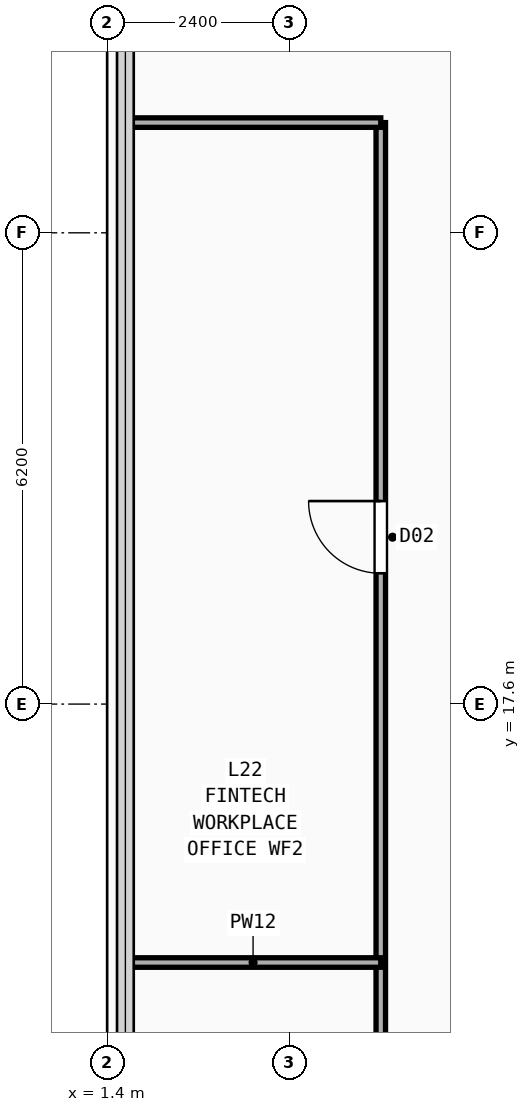
"""IFC4 building model, lengths in metres.
Left out: names, types, materials, properties, quantities, classifications, styles, units other than length and angle.
Written with IfcOpenShell. Run it as: python <this file> out.ifc"""

import sys

from ifc_helpers import new_model, si_unit, direction, frame, frame_2d, origin, place, context, subcontext, project, spatial, rectangle, extrude, element, fill, save


model = new_model("IFC4")
c1 = context("Model", 3, precision=1e-05, world=origin(), true_north=direction((0.0, 1.0)))
c2 = subcontext(c1, "Body", "Model", "MODEL_VIEW")
j1 = project(units=[si_unit("LENGTHUNIT", "METRE"), si_unit("PLANEANGLEUNIT", "RADIAN")], contexts=[c1])
p1 = place(None, origin())
s1 = spatial("IfcSite", under=j1, at=p1, CompositionType="ELEMENT")
p2 = place(p1, origin())
s2 = spatial("IfcBuilding", under=s1, at=p2, CompositionType="ELEMENT")
p3 = place(p2, frame((0.0, 0.0, 87.9)))
s3 = spatial("IfcBuildingStorey", under=s2, at=p3, CompositionType="ELEMENT", Elevation=87.9)
p4 = place(p3, frame((5.0, 7.5, 0.0), z_axis=(0.0, 0.0, 1.0), x_axis=(0.0, 1.0, 0.0)))
e1 = element("IfcWall", 1, at=p4, inside=s3, PredefinedType="PARTITIONING", context=c2, shape_type="SweptSolid", body=[
    extrude(rectangle(XDim=17.75, YDim=0.125, at=frame_2d((8.875, 0.0))), origin(), (0.0, 0.0, 1.0), 3.54),
])
p5 = place(p4, frame((2.85, 0.0, 0.0)))
e2 = element("IfcOpeningElement", 2, at=p5, cuts=e1, PredefinedType="OPENING", context=c2, shape_type="SweptSolid", body=[
    extrude(rectangle(XDim=0.95, YDim=2.15, at=frame_2d((0.475, 1.075))), frame((0.0, 0.073, 0.0), z_axis=(0.0, -1.0, 0.0), x_axis=(1.0, 0.0, 0.0)), (0.0, 0.0, 1.0), 0.145),
])
p6 = place(p4, frame((11.821, 0.0, 0.0)))
e3 = element("IfcOpeningElement", 3, at=p6, cuts=e1, PredefinedType="OPENING", context=c2, shape_type="SweptSolid", body=[
    extrude(rectangle(XDim=0.95, YDim=2.15, at=frame_2d((0.475, 1.075))), frame((0.0, 0.073, 0.0), z_axis=(0.0, -1.0, 0.0), x_axis=(1.0, 0.0, 0.0)), (0.0, 0.0, 1.0), 0.145),
])
for number, where, z_axis, x_axis in (
    (4, (1.64, 25.25, 0.0), (0.0, 0.0, 1.0), (1.0, 0.0, 0.0)),
    (5, (1.64, 14.2, 0.0), (0.0, 0.0, 1.0), (1.0, 0.0, 0.0)),
):
    element("IfcWall", number, at=place(p3, frame(where, z_axis=z_axis, x_axis=x_axis)), inside=s3, PredefinedType="PARTITIONING", context=c2, shape_type="SweptSolid", body=[
        extrude(rectangle(XDim=3.36, YDim=0.125, at=frame_2d((1.68, 0.0))), origin(), (0.0, 0.0, 1.0), 3.54),
    ])
p7 = place(p6, origin())
e6 = element("IfcDoor", 6, at=p7, inside=s3, OperationType="SINGLE_SWING_RIGHT", PredefinedType="DOOR", context=c2, shape_type="SweptSolid", body=[
    extrude(rectangle(XDim=0.95, YDim=2.15, at=frame_2d((0.475, 1.075))), frame((0.0, 0.025, 0.0), z_axis=(0.0, -1.0, 0.0), x_axis=(1.0, 0.0, 0.0)), (0.0, 0.0, 1.0), 0.05),
])
fill(e3, e6)
save(model, sys.argv[1])
